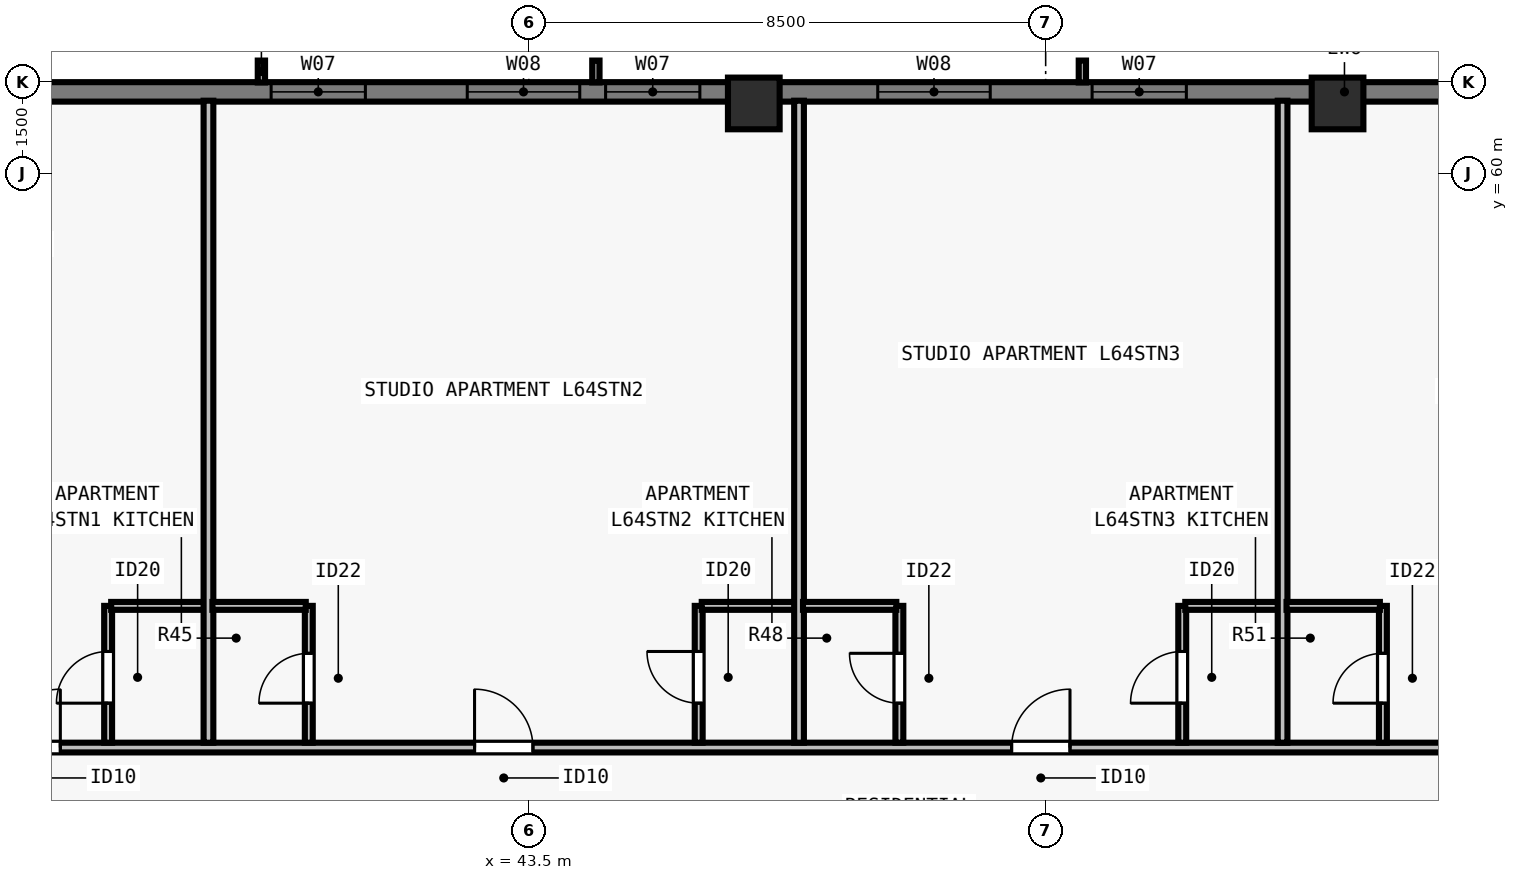
"""IFC4 building model, lengths in metres.
Left out: names, types, materials, properties, quantities, classifications, styles, units other than length and angle.
Written with IfcOpenShell. Run it as: python <this file> out.ifc"""

import sys

from ifc_helpers import new_model, si_unit, direction, frame, frame_2d, origin, origin_2d, place, context, subcontext, project, spatial, rectangle, extrude, element, fill, save


model = new_model("IFC4")
c1 = context("Model", 3, precision=1e-05, world=origin(), true_north=direction((0.0, 1.0)))
c2 = subcontext(c1, "Body", "Model", "MODEL_VIEW")
j1 = project(units=[si_unit("LENGTHUNIT", "METRE"), si_unit("PLANEANGLEUNIT", "RADIAN")], contexts=[c1])
p1 = place(None, origin())
s1 = spatial("IfcSite", under=j1, at=p1, CompositionType="ELEMENT")
p2 = place(p1, origin())
s2 = spatial("IfcBuilding", under=s1, at=p2, CompositionType="ELEMENT")
p3 = place(p2, frame((0.0, 0.0, 234.0)))
s3 = spatial("IfcBuildingStorey", under=s2, at=p3, CompositionType="ELEMENT", Elevation=234.0)
for number, where, z_axis, x_axis in (
    (1, (56.8, 61.15, 0.0), (0.0, 0.0, 1.0), (1.0, 0.0, 0.0)),
    (2, (47.2, 61.15, 0.0), (0.0, 0.0, 1.0), (1.0, 0.0, 0.0)),
):
    element("IfcColumn", number, at=place(p3, frame(where, z_axis=z_axis, x_axis=x_axis)), inside=s3, PredefinedType="COLUMN", context=c2, shape_type="SweptSolid", body=[
        extrude(rectangle(XDim=0.85, YDim=0.85, at=origin_2d()), origin(), (0.0, 0.0, 1.0), 3.5),
    ])
p4 = place(p3, frame((34.5, 61.34, 0.0), z_axis=(0.0, 0.0, 1.0), x_axis=(1.0, 0.0, 0.0)))
e3 = element("IfcWall", 3, at=p4, inside=s3, PredefinedType="SOLIDWALL", context=c2, shape_type="SweptSolid", body=[
    extrude(rectangle(XDim=34.702, YDim=0.32, at=frame_2d((17.351, 0.0))), origin(), (0.0, 0.0, 1.0), 3.29),
])
p5 = place(p4, frame((4.763, 0.0, 0.8)))
e4 = element("IfcOpeningElement", 4, at=p5, cuts=e3, PredefinedType="OPENING", context=c2, shape_type="SweptSolid", body=[
    extrude(rectangle(XDim=1.55, YDim=1.678, at=frame_2d((0.775, 0.839))), frame((0.0, 0.17, 0.0), z_axis=(0.0, -1.0, 0.0), x_axis=(1.0, 0.0, 0.0)), (0.0, 0.0, 1.0), 0.34),
])
p6 = place(p4, frame((7.988, 0.0, 0.8)))
e5 = element("IfcOpeningElement", 5, at=p6, cuts=e3, PredefinedType="OPENING", context=c2, shape_type="SweptSolid", body=[
    extrude(rectangle(XDim=1.85, YDim=1.678, at=frame_2d((0.925, 0.839))), frame((0.0, 0.17, 0.0), z_axis=(0.0, -1.0, 0.0), x_axis=(1.0, 0.0, 0.0)), (0.0, 0.0, 1.0), 0.34),
])
p7 = place(p4, frame((10.263, 0.0, 0.8)))
e6 = element("IfcOpeningElement", 6, at=p7, cuts=e3, PredefinedType="OPENING", context=c2, shape_type="SweptSolid", body=[
    extrude(rectangle(XDim=1.55, YDim=1.678, at=frame_2d((0.775, 0.839))), frame((0.0, 0.17, 0.0), z_axis=(0.0, -1.0, 0.0), x_axis=(1.0, 0.0, 0.0)), (0.0, 0.0, 1.0), 0.34),
])
p8 = place(p4, frame((14.738, 0.0, 0.8)))
e7 = element("IfcOpeningElement", 7, at=p8, cuts=e3, PredefinedType="OPENING", context=c2, shape_type="SweptSolid", body=[
    extrude(rectangle(XDim=1.85, YDim=1.678, at=frame_2d((0.925, 0.839))), frame((0.0, 0.17, 0.0), z_axis=(0.0, -1.0, 0.0), x_axis=(1.0, 0.0, 0.0)), (0.0, 0.0, 1.0), 0.34),
])
p9 = place(p4, frame((18.264, 0.0, 0.8)))
e8 = element("IfcOpeningElement", 8, at=p9, cuts=e3, PredefinedType="OPENING", context=c2, shape_type="SweptSolid", body=[
    extrude(rectangle(XDim=1.55, YDim=1.678, at=frame_2d((0.775, 0.839))), frame((0.0, 0.17, 0.0), z_axis=(0.0, -1.0, 0.0), x_axis=(1.0, 0.0, 0.0)), (0.0, 0.0, 1.0), 0.34),
])
p10 = place(p4, frame((25.014, 0.0, 0.8)))
e9 = element("IfcOpeningElement", 9, at=p10, cuts=e3, PredefinedType="OPENING", context=c2, shape_type="SweptSolid", body=[
    extrude(rectangle(XDim=1.55, YDim=1.678, at=frame_2d((0.775, 0.839))), frame((0.0, 0.17, 0.0), z_axis=(0.0, -1.0, 0.0), x_axis=(1.0, 0.0, 0.0)), (0.0, 0.0, 1.0), 0.34),
])
p11 = place(p4, frame((28.24, 0.0, 0.8)))
e10 = element("IfcOpeningElement", 10, at=p11, cuts=e3, PredefinedType="OPENING", context=c2, shape_type="SweptSolid", body=[
    extrude(rectangle(XDim=1.85, YDim=1.678, at=frame_2d((0.925, 0.839))), frame((0.0, 0.17, 0.0), z_axis=(0.0, -1.0, 0.0), x_axis=(1.0, 0.0, 0.0)), (0.0, 0.0, 1.0), 0.34),
])
p12 = place(p3, frame((29.77, 50.558, 0.0), z_axis=(0.0, 0.0, 1.0), x_axis=(1.0, 0.0, 0.0)))
e11 = element("IfcWall", 11, at=p12, inside=s3, PredefinedType="PARTITIONING", context=c2, shape_type="SweptSolid", body=[
    extrude(rectangle(XDim=44.425, YDim=0.16, at=frame_2d((22.212, 0.0))), origin(), (0.0, 0.0, 1.0), 2.958),
])
p13 = place(p12, frame((5.066, 0.0, 0.0)))
e12 = element("IfcOpeningElement", 12, at=p13, cuts=e11, PredefinedType="OPENING", context=c2, shape_type="SweptSolid", body=[
    extrude(rectangle(XDim=0.96, YDim=2.18, at=frame_2d((0.48, 1.09))), frame((0.0, 0.09, 0.0), z_axis=(0.0, -1.0, 0.0), x_axis=(1.0, 0.0, 0.0)), (0.0, 0.0, 1.0), 0.18),
])
p14 = place(p12, frame((12.838, 0.0, 0.0)))
e13 = element("IfcOpeningElement", 13, at=p14, cuts=e11, PredefinedType="OPENING", context=c2, shape_type="SweptSolid", body=[
    extrude(rectangle(XDim=0.96, YDim=2.18, at=frame_2d((0.48, 1.09))), frame((0.0, 0.09, 0.0), z_axis=(0.0, -1.0, 0.0), x_axis=(1.0, 0.0, 0.0)), (0.0, 0.0, 1.0), 0.18),
])
p15 = place(p12, frame((21.67, 0.0, 0.0)))
e14 = element("IfcOpeningElement", 14, at=p15, cuts=e11, PredefinedType="OPENING", context=c2, shape_type="SweptSolid", body=[
    extrude(rectangle(XDim=0.96, YDim=2.18, at=frame_2d((0.48, 1.09))), frame((0.0, 0.09, 0.0), z_axis=(0.0, -1.0, 0.0), x_axis=(1.0, 0.0, 0.0)), (0.0, 0.0, 1.0), 0.18),
])
p16 = place(p12, frame((30.502, 0.0, 0.0)))
e15 = element("IfcOpeningElement", 15, at=p16, cuts=e11, PredefinedType="OPENING", context=c2, shape_type="SweptSolid", body=[
    extrude(rectangle(XDim=0.96, YDim=2.18, at=frame_2d((0.48, 1.09))), frame((0.0, 0.09, 0.0), z_axis=(0.0, -1.0, 0.0), x_axis=(1.0, 0.0, 0.0)), (0.0, 0.0, 1.0), 0.18),
])
p17 = place(p12, frame((39.594, 0.0, 0.0)))
e16 = element("IfcOpeningElement", 16, at=p17, cuts=e11, PredefinedType="OPENING", context=c2, shape_type="SweptSolid", body=[
    extrude(rectangle(XDim=0.96, YDim=2.18, at=frame_2d((0.48, 1.09))), frame((0.0, 0.09, 0.0), z_axis=(0.0, -1.0, 0.0), x_axis=(1.0, 0.0, 0.0)), (0.0, 0.0, 1.0), 0.18),
])
p18 = place(p3, frame((36.582, 50.637, 0.0), z_axis=(0.0, 0.0, 1.0), x_axis=(0.0, 1.0, 0.0)))
e17 = element("IfcWall", 17, at=p18, inside=s3, PredefinedType="PLUMBINGWALL", context=c2, shape_type="SweptSolid", body=[
    extrude(rectangle(XDim=2.25, YDim=0.13, at=frame_2d((1.125, 0.0))), origin(), (0.0, 0.0, 1.0), 3.29),
])
p19 = place(p18, frame((0.65, 0.0, 0.0)))
e18 = element("IfcOpeningElement", 18, at=p19, cuts=e17, PredefinedType="OPENING", context=c2, shape_type="SweptSolid", body=[
    extrude(rectangle(XDim=0.85, YDim=2.1, at=frame_2d((0.425, 1.05))), frame((0.0, 0.075, 0.0), z_axis=(0.0, -1.0, 0.0), x_axis=(1.0, 0.0, 0.0)), (0.0, 0.0, 1.0), 0.15),
])
p20 = place(p3, frame((36.632, 52.887, 0.0), z_axis=(0.0, 0.0, 1.0), x_axis=(1.0, 0.0, 0.0)))
e19 = element("IfcWall", 19, at=p20, inside=s3, PredefinedType="PLUMBINGWALL", context=c2, shape_type="SweptSolid", body=[
    extrude(rectangle(XDim=1.6, YDim=0.13, at=frame_2d((0.8, 0.0))), origin(), (0.0, 0.0, 1.0), 3.29),
])
p21 = place(p3, frame((38.232, 50.637, 0.0), z_axis=(0.0, 0.0, 1.0), x_axis=(0.0, 1.0, 0.0)))
e20 = element("IfcWall", 20, at=p21, inside=s3, PredefinedType="PARTITIONING", context=c2, shape_type="SweptSolid", body=[
    extrude(rectangle(XDim=10.558, YDim=0.16, at=frame_2d((5.279, 0.0))), origin(), (0.0, 0.0, 1.0), 2.573),
])
p22 = place(p3, frame((39.882, 50.637, 0.0), z_axis=(0.0, 0.0, 1.0), x_axis=(0.0, 1.0, 0.0)))
e21 = element("IfcWall", 21, at=p22, inside=s3, PredefinedType="PLUMBINGWALL", context=c2, shape_type="SweptSolid", body=[
    extrude(rectangle(XDim=2.25, YDim=0.13, at=frame_2d((1.125, 0.0))), origin(), (0.0, 0.0, 1.0), 3.29),
])
p23 = place(p22, frame((0.65, 0.0, 0.0)))
e22 = element("IfcOpeningElement", 22, at=p23, cuts=e21, PredefinedType="OPENING", context=c2, shape_type="SweptSolid", body=[
    extrude(rectangle(XDim=0.82, YDim=2.1, at=frame_2d((0.41, 1.05))), frame((0.0, 0.075, 0.0), z_axis=(0.0, -1.0, 0.0), x_axis=(1.0, 0.0, 0.0)), (0.0, 0.0, 1.0), 0.15),
])
p24 = place(p3, frame((38.297, 52.887, 0.0), z_axis=(0.0, 0.0, 1.0), x_axis=(1.0, 0.0, 0.0)))
e23 = element("IfcWall", 23, at=p24, inside=s3, PredefinedType="PLUMBINGWALL", context=c2, shape_type="SweptSolid", body=[
    extrude(rectangle(XDim=1.535, YDim=0.13, at=frame_2d((0.768, 0.0))), origin(), (0.0, 0.0, 1.0), 3.29),
])
p25 = place(p3, frame((46.294, 50.637, 0.0), z_axis=(0.0, 0.0, 1.0), x_axis=(0.0, 1.0, 0.0)))
e24 = element("IfcWall", 24, at=p25, inside=s3, PredefinedType="PLUMBINGWALL", context=c2, shape_type="SweptSolid", body=[
    extrude(rectangle(XDim=2.25, YDim=0.13, at=frame_2d((1.125, 0.0))), origin(), (0.0, 0.0, 1.0), 3.29),
])
p26 = place(p25, frame((0.65, 0.0, 0.0)))
e25 = element("IfcOpeningElement", 25, at=p26, cuts=e24, PredefinedType="OPENING", context=c2, shape_type="SweptSolid", body=[
    extrude(rectangle(XDim=0.85, YDim=2.1, at=frame_2d((0.425, 1.05))), frame((0.0, 0.075, 0.0), z_axis=(0.0, -1.0, 0.0), x_axis=(1.0, 0.0, 0.0)), (0.0, 0.0, 1.0), 0.15),
])
p27 = place(p3, frame((46.344, 52.887, 0.0), z_axis=(0.0, 0.0, 1.0), x_axis=(1.0, 0.0, 0.0)))
e26 = element("IfcWall", 26, at=p27, inside=s3, PredefinedType="PLUMBINGWALL", context=c2, shape_type="SweptSolid", body=[
    extrude(rectangle(XDim=1.6, YDim=0.13, at=frame_2d((0.8, 0.0))), origin(), (0.0, 0.0, 1.0), 3.29),
])
p28 = place(p3, frame((47.944, 50.637, 0.0), z_axis=(0.0, 0.0, 1.0), x_axis=(0.0, 1.0, 0.0)))
e27 = element("IfcWall", 27, at=p28, inside=s3, PredefinedType="PARTITIONING", context=c2, shape_type="SweptSolid", body=[
    extrude(rectangle(XDim=10.558, YDim=0.16, at=frame_2d((5.279, 0.0))), origin(), (0.0, 0.0, 1.0), 3.29),
])
p29 = place(p3, frame((49.594, 50.637, 0.0), z_axis=(0.0, 0.0, 1.0), x_axis=(0.0, 1.0, 0.0)))
e28 = element("IfcWall", 28, at=p29, inside=s3, PredefinedType="PLUMBINGWALL", context=c2, shape_type="SweptSolid", body=[
    extrude(rectangle(XDim=2.25, YDim=0.13, at=frame_2d((1.125, 0.0))), origin(), (0.0, 0.0, 1.0), 2.958),
])
p30 = place(p29, frame((0.65, 0.0, 0.0)))
e29 = element("IfcOpeningElement", 29, at=p30, cuts=e28, PredefinedType="OPENING", context=c2, shape_type="SweptSolid", body=[
    extrude(rectangle(XDim=0.82, YDim=2.1, at=frame_2d((0.41, 1.05))), frame((0.0, 0.075, 0.0), z_axis=(0.0, -1.0, 0.0), x_axis=(1.0, 0.0, 0.0)), (0.0, 0.0, 1.0), 0.15),
])
p31 = place(p3, frame((48.009, 52.887, 0.0), z_axis=(0.0, 0.0, 1.0), x_axis=(1.0, 0.0, 0.0)))
e30 = element("IfcWall", 30, at=p31, inside=s3, PredefinedType="PLUMBINGWALL", context=c2, shape_type="SweptSolid", body=[
    extrude(rectangle(XDim=1.535, YDim=0.13, at=frame_2d((0.768, 0.0))), origin(), (0.0, 0.0, 1.0), 3.29),
])
p32 = place(p3, frame((54.246, 50.637, 0.0), z_axis=(0.0, 0.0, 1.0), x_axis=(0.0, 1.0, 0.0)))
e31 = element("IfcWall", 31, at=p32, inside=s3, PredefinedType="PLUMBINGWALL", context=c2, shape_type="SweptSolid", body=[
    extrude(rectangle(XDim=2.25, YDim=0.13, at=frame_2d((1.125, 0.0))), origin(), (0.0, 0.0, 1.0), 3.29),
])
p33 = place(p32, frame((0.65, 0.0, 0.0)))
e32 = element("IfcOpeningElement", 32, at=p33, cuts=e31, PredefinedType="OPENING", context=c2, shape_type="SweptSolid", body=[
    extrude(rectangle(XDim=0.85, YDim=2.1, at=frame_2d((0.425, 1.05))), frame((0.0, 0.075, 0.0), z_axis=(0.0, -1.0, 0.0), x_axis=(1.0, 0.0, 0.0)), (0.0, 0.0, 1.0), 0.15),
])
p34 = place(p3, frame((54.296, 52.887, 0.0), z_axis=(0.0, 0.0, 1.0), x_axis=(1.0, 0.0, 0.0)))
e33 = element("IfcWall", 33, at=p34, inside=s3, PredefinedType="PLUMBINGWALL", context=c2, shape_type="SweptSolid", body=[
    extrude(rectangle(XDim=1.6, YDim=0.13, at=frame_2d((0.8, 0.0))), origin(), (0.0, 0.0, 1.0), 3.29),
])
p35 = place(p3, frame((55.896, 50.637, 0.0), z_axis=(0.0, 0.0, 1.0), x_axis=(0.0, 1.0, 0.0)))
e34 = element("IfcWall", 34, at=p35, inside=s3, PredefinedType="PARTITIONING", context=c2, shape_type="SweptSolid", body=[
    extrude(rectangle(XDim=10.558, YDim=0.16, at=frame_2d((5.279, 0.0))), origin(), (0.0, 0.0, 1.0), 2.958),
])
p36 = place(p3, frame((57.546, 50.637, 0.0), z_axis=(0.0, 0.0, 1.0), x_axis=(0.0, 1.0, 0.0)))
e35 = element("IfcWall", 35, at=p36, inside=s3, PredefinedType="PLUMBINGWALL", context=c2, shape_type="SweptSolid", body=[
    extrude(rectangle(XDim=2.25, YDim=0.13, at=frame_2d((1.125, 0.0))), origin(), (0.0, 0.0, 1.0), 3.29),
])
p37 = place(p36, frame((0.65, 0.0, 0.0)))
e36 = element("IfcOpeningElement", 36, at=p37, cuts=e35, PredefinedType="OPENING", context=c2, shape_type="SweptSolid", body=[
    extrude(rectangle(XDim=0.82, YDim=2.1, at=frame_2d((0.41, 1.05))), frame((0.0, 0.075, 0.0), z_axis=(0.0, -1.0, 0.0), x_axis=(1.0, 0.0, 0.0)), (0.0, 0.0, 1.0), 0.15),
])
p38 = place(p3, frame((55.961, 52.887, 0.0), z_axis=(0.0, 0.0, 1.0), x_axis=(1.0, 0.0, 0.0)))
e37 = element("IfcWall", 37, at=p38, inside=s3, PredefinedType="PLUMBINGWALL", context=c2, shape_type="SweptSolid", body=[
    extrude(rectangle(XDim=1.535, YDim=0.13, at=frame_2d((0.768, 0.0))), origin(), (0.0, 0.0, 1.0), 3.29),
])
p39 = place(p5, origin())
e38 = element("IfcWindow", 38, at=p39, inside=s3, PartitioningType="SINGLE_PANEL", PredefinedType="WINDOW", context=c2, shape_type="SweptSolid", body=[
    extrude(rectangle(XDim=1.55, YDim=1.678, at=frame_2d((0.775, 0.839))), frame((0.0, -0.05, 0.0), z_axis=(0.0, -1.0, 0.0), x_axis=(1.0, 0.0, 0.0)), (0.0, 0.0, 1.0), 0.06),
])
fill(e4, e38)
p40 = place(p6, origin())
e39 = element("IfcWindow", 39, at=p40, inside=s3, PartitioningType="SINGLE_PANEL", PredefinedType="WINDOW", context=c2, shape_type="SweptSolid", body=[
    extrude(rectangle(XDim=1.85, YDim=1.678, at=frame_2d((0.925, 0.839))), frame((0.0, -0.05, 0.0), z_axis=(0.0, -1.0, 0.0), x_axis=(1.0, 0.0, 0.0)), (0.0, 0.0, 1.0), 0.06),
])
fill(e5, e39)
p41 = place(p7, origin())
e40 = element("IfcWindow", 40, at=p41, inside=s3, PartitioningType="SINGLE_PANEL", PredefinedType="WINDOW", context=c2, shape_type="SweptSolid", body=[
    extrude(rectangle(XDim=1.55, YDim=1.678, at=frame_2d((0.775, 0.839))), frame((0.0, -0.05, 0.0), z_axis=(0.0, -1.0, 0.0), x_axis=(1.0, 0.0, 0.0)), (0.0, 0.0, 1.0), 0.06),
])
fill(e6, e40)
p42 = place(p8, origin())
e41 = element("IfcWindow", 41, at=p42, inside=s3, PartitioningType="SINGLE_PANEL", PredefinedType="WINDOW", context=c2, shape_type="SweptSolid", body=[
    extrude(rectangle(XDim=1.85, YDim=1.678, at=frame_2d((0.925, 0.839))), frame((0.0, -0.05, 0.0), z_axis=(0.0, -1.0, 0.0), x_axis=(1.0, 0.0, 0.0)), (0.0, 0.0, 1.0), 0.06),
])
fill(e7, e41)
p43 = place(p9, origin())
e42 = element("IfcWindow", 42, at=p43, inside=s3, PartitioningType="SINGLE_PANEL", PredefinedType="WINDOW", context=c2, shape_type="SweptSolid", body=[
    extrude(rectangle(XDim=1.55, YDim=1.678, at=frame_2d((0.775, 0.839))), frame((0.0, -0.05, 0.0), z_axis=(0.0, -1.0, 0.0), x_axis=(1.0, 0.0, 0.0)), (0.0, 0.0, 1.0), 0.06),
])
fill(e8, e42)
p44 = place(p19, origin())
e43 = element("IfcDoor", 43, at=p44, inside=s3, OperationType="SINGLE_SWING_LEFT", PredefinedType="DOOR", context=c2, shape_type="SweptSolid", body=[
    extrude(rectangle(XDim=0.85, YDim=2.1, at=frame_2d((0.425, 1.05))), frame((0.0, 0.025, 0.0), z_axis=(0.0, -1.0, 0.0), x_axis=(1.0, 0.0, 0.0)), (0.0, 0.0, 1.0), 0.05),
])
fill(e18, e43)
p45 = place(p13, origin())
e44 = element("IfcDoor", 44, at=p45, inside=s3, OperationType="SINGLE_SWING_RIGHT", PredefinedType="DOOR", context=c2, shape_type="SweptSolid", body=[
    extrude(rectangle(XDim=0.96, YDim=2.18, at=frame_2d((0.48, 1.09))), frame((0.0, 0.025, 0.0), z_axis=(0.0, -1.0, 0.0), x_axis=(1.0, 0.0, 0.0)), (0.0, 0.0, 1.0), 0.05),
])
fill(e12, e44)
p46 = place(p23, origin())
e45 = element("IfcDoor", 45, at=p46, inside=s3, OperationType="SINGLE_SWING_LEFT", PredefinedType="DOOR", context=c2, shape_type="SweptSolid", body=[
    extrude(rectangle(XDim=0.82, YDim=2.1, at=frame_2d((0.41, 1.05))), frame((0.0, 0.025, 0.0), z_axis=(0.0, -1.0, 0.0), x_axis=(1.0, 0.0, 0.0)), (0.0, 0.0, 1.0), 0.05),
])
fill(e22, e45)
p47 = place(p26, origin())
e46 = element("IfcDoor", 46, at=p47, inside=s3, OperationType="SINGLE_SWING_RIGHT", PredefinedType="DOOR", context=c2, shape_type="SweptSolid", body=[
    extrude(rectangle(XDim=0.85, YDim=2.1, at=frame_2d((0.425, 1.05))), frame((0.0, 0.025, 0.0), z_axis=(0.0, -1.0, 0.0), x_axis=(1.0, 0.0, 0.0)), (0.0, 0.0, 1.0), 0.05),
])
fill(e25, e46)
p48 = place(p14, origin())
e47 = element("IfcDoor", 47, at=p48, inside=s3, OperationType="SINGLE_SWING_LEFT", PredefinedType="DOOR", context=c2, shape_type="SweptSolid", body=[
    extrude(rectangle(XDim=0.96, YDim=2.18, at=frame_2d((0.48, 1.09))), frame((0.0, 0.025, 0.0), z_axis=(0.0, -1.0, 0.0), x_axis=(1.0, 0.0, 0.0)), (0.0, 0.0, 1.0), 0.05),
])
fill(e13, e47)
p49 = place(p30, origin())
e48 = element("IfcDoor", 48, at=p49, inside=s3, OperationType="SINGLE_SWING_RIGHT", PredefinedType="DOOR", context=c2, shape_type="SweptSolid", body=[
    extrude(rectangle(XDim=0.82, YDim=2.1, at=frame_2d((0.41, 1.05))), frame((0.0, 0.025, 0.0), z_axis=(0.0, -1.0, 0.0), x_axis=(1.0, 0.0, 0.0)), (0.0, 0.0, 1.0), 0.05),
])
fill(e29, e48)
p50 = place(p33, origin())
e49 = element("IfcDoor", 49, at=p50, inside=s3, OperationType="SINGLE_SWING_LEFT", PredefinedType="DOOR", context=c2, shape_type="SweptSolid", body=[
    extrude(rectangle(XDim=0.85, YDim=2.1, at=frame_2d((0.425, 1.05))), frame((0.0, 0.025, 0.0), z_axis=(0.0, -1.0, 0.0), x_axis=(1.0, 0.0, 0.0)), (0.0, 0.0, 1.0), 0.05),
])
fill(e32, e49)
p51 = place(p15, origin())
e50 = element("IfcDoor", 50, at=p51, inside=s3, OperationType="SINGLE_SWING_RIGHT", PredefinedType="DOOR", context=c2, shape_type="SweptSolid", body=[
    extrude(rectangle(XDim=0.96, YDim=2.18, at=frame_2d((0.48, 1.09))), frame((0.0, 0.025, 0.0), z_axis=(0.0, -1.0, 0.0), x_axis=(1.0, 0.0, 0.0)), (0.0, 0.0, 1.0), 0.05),
])
fill(e14, e50)
p52 = place(p37, origin())
e51 = element("IfcDoor", 51, at=p52, inside=s3, OperationType="SINGLE_SWING_LEFT", PredefinedType="DOOR", context=c2, shape_type="SweptSolid", body=[
    extrude(rectangle(XDim=0.82, YDim=2.1, at=frame_2d((0.41, 1.05))), frame((0.0, 0.025, 0.0), z_axis=(0.0, -1.0, 0.0), x_axis=(1.0, 0.0, 0.0)), (0.0, 0.0, 1.0), 0.05),
])
fill(e36, e51)
save(model, sys.argv[1])
